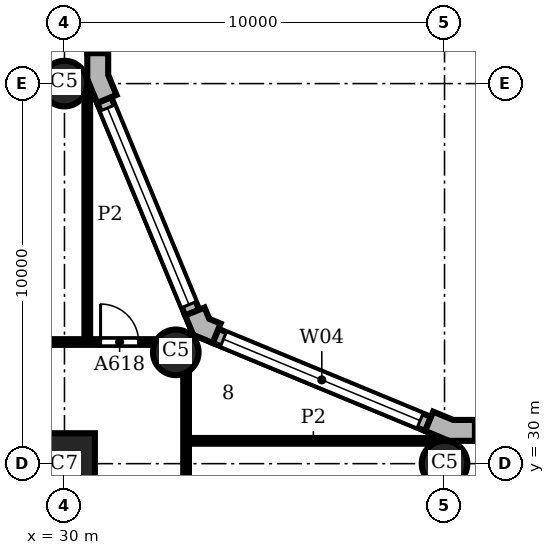
"""IFC4 building model, lengths in metres.
Left out: names, types, materials, properties, quantities, classifications, styles, units other than length and angle.
Written with IfcOpenShell. Run it as: python <this file> out.ifc"""

import sys

from ifc_helpers import new_model, si_unit, direction, frame, frame_2d, origin, origin_2d, place, context, subcontext, project, spatial, polyline, rectangle, circle, outline, extrude, element, fill, save


model = new_model("IFC4")
c1 = context("Model", 3, precision=1e-05, world=origin(), true_north=direction((0.0, 1.0)))
c2 = subcontext(c1, "Body", "Model", "MODEL_VIEW")
j1 = project(units=[si_unit("LENGTHUNIT", "METRE"), si_unit("PLANEANGLEUNIT", "RADIAN")], contexts=[c1])
p1 = place(None, origin())
s1 = spatial("IfcSite", under=j1, at=p1, CompositionType="ELEMENT")
p2 = place(p1, origin())
s2 = spatial("IfcBuilding", under=s1, at=p2, CompositionType="ELEMENT")
p3 = place(p2, frame((0.0, 0.0, 70.5)))
s3 = spatial("IfcBuildingStorey", under=s2, at=p3, CompositionType="ELEMENT", Elevation=70.5)
for number, where, z_axis, x_axis in (
    (1, (40.0, 30.0, 0.0), (0.0, 0.0, 1.0), (1.0, 0.0, 0.0)),
    (2, (32.929, 32.929, 0.0), (0.0, 0.0, 1.0), (1.0, 0.0, 0.0)),
    (3, (30.0, 40.0, 0.0), (0.0, 0.0, 1.0), (1.0, 0.0, 0.0)),
):
    element("IfcColumn", number, at=place(p3, frame(where, z_axis=z_axis, x_axis=x_axis)), inside=s3, PredefinedType="COLUMN", context=c2, shape_type="SweptSolid", body=[
        extrude(circle(Radius=0.6, at=origin_2d()), origin(), (0.0, 0.0, 1.0), 3.9),
    ])
p4 = place(p3, frame((30.0, 30.0, 0.0), z_axis=(0.0, 0.0, 1.0), x_axis=(1.0, 0.0, 0.0)))
e4 = element("IfcColumn", 4, at=p4, inside=s3, PredefinedType="COLUMN", context=c2, shape_type="SweptSolid", body=[
    extrude(rectangle(XDim=1.6, YDim=1.6, at=origin_2d()), origin(), (0.0, 0.0, 1.0), 3.9),
])
p5 = place(p3, origin())
e5 = element("IfcWall", 5, at=p5, inside=s3, PredefinedType="SOLIDWALL", context=c2, shape_type="SweptSolid", body=[
    extrude(outline(polyline([(40.8, 31.0), (40.8, 31.15), (40.229, 31.15), (39.701, 31.369), (39.644, 31.23), (39.49, 30.861), (40.119, 30.6), (40.8, 30.6), (40.8, 31.0)])), origin(), (0.0, 0.0, 1.0), 3.9),
])
e6 = element("IfcWall", 6, at=p5, inside=s3, PredefinedType="SOLIDWALL", context=c2, shape_type="SweptSolid", body=[
    extrude(outline(polyline([(34.051, 33.547), (34.108, 33.685), (33.809, 33.809), (33.685, 34.108), (33.547, 34.051), (33.177, 33.898), (33.388, 33.388), (33.898, 33.177), (34.051, 33.547)])), origin(), (0.0, 0.0, 1.0), 3.9),
])
e7 = element("IfcWall", 7, at=p5, inside=s3, PredefinedType="SOLIDWALL", context=c2, shape_type="SweptSolid", body=[
    extrude(outline(polyline([(31.23, 39.644), (31.369, 39.701), (31.15, 40.229), (31.15, 40.8), (31.0, 40.8), (30.6, 40.8), (30.6, 40.119), (30.861, 39.49), (31.23, 39.644)])), origin(), (0.0, 0.0, 1.0), 3.9),
])
p6 = place(p3, frame((69.2, 30.8, 0.0), z_axis=(0.0, 0.0, 1.0), x_axis=(-1.0, 0.0, 0.0)))
e8 = element("IfcWall", 8, at=p6, inside=s3, PredefinedType="SOLIDWALL", context=c2, shape_type="SweptSolid", body=[
    extrude(rectangle(XDim=28.4, YDim=0.4, at=frame_2d((14.2, 0.0))), origin(), (0.0, 0.0, 1.0), 3.9),
])
p7 = place(p6, frame((0.2, 0.0, 0.9)))
e9 = element("IfcOpeningElement", 9, at=p7, cuts=e8, PredefinedType="OPENING", context=c2, shape_type="SweptSolid", body=[
    extrude(rectangle(XDim=8.0, YDim=2.35, at=frame_2d((4.0, 1.175))), frame((0.0, 0.21, 0.0), z_axis=(0.0, -1.0, 0.0), x_axis=(1.0, 0.0, 0.0)), (0.0, 0.0, 1.0), 0.42),
])
p8 = place(p6, frame((10.2, 0.0, 0.9)))
e10 = element("IfcOpeningElement", 10, at=p8, cuts=e8, PredefinedType="OPENING", context=c2, shape_type="SweptSolid", body=[
    extrude(rectangle(XDim=8.0, YDim=2.35, at=frame_2d((4.0, 1.175))), frame((0.0, 0.21, 0.0), z_axis=(0.0, -1.0, 0.0), x_axis=(1.0, 0.0, 0.0)), (0.0, 0.0, 1.0), 0.42),
])
p9 = place(p6, frame((20.2, 0.0, 0.9)))
e11 = element("IfcOpeningElement", 11, at=p9, cuts=e8, PredefinedType="OPENING", context=c2, shape_type="SweptSolid", body=[
    extrude(rectangle(XDim=8.0, YDim=2.35, at=frame_2d((4.0, 1.175))), frame((0.0, 0.21, 0.0), z_axis=(0.0, -1.0, 0.0), x_axis=(1.0, 0.0, 0.0)), (0.0, 0.0, 1.0), 0.42),
])
p10 = place(p3, frame((39.567, 31.045, 0.0), z_axis=(0.0, 0.0, 1.0), x_axis=(-0.923891000409, 0.382655745237, 0.0)))
e12 = element("IfcWall", 12, at=p10, inside=s3, PredefinedType="SOLIDWALL", context=c2, shape_type="SweptSolid", body=[
    extrude(rectangle(XDim=6.053, YDim=0.4, at=frame_2d((3.027, 0.0))), origin(), (0.0, 0.0, 1.0), 3.9),
])
p11 = place(p10, frame((0.227, 0.0, 0.9)))
e13 = element("IfcOpeningElement", 13, at=p11, cuts=e12, PredefinedType="OPENING", context=c2, shape_type="SweptSolid", body=[
    extrude(rectangle(XDim=5.6, YDim=2.35, at=frame_2d((2.8, 1.175))), frame((0.0, 0.21, 0.0), z_axis=(0.0, -1.0, 0.0), x_axis=(1.0, 0.0, 0.0)), (0.0, 0.0, 1.0), 0.42),
])
p12 = place(p3, frame((33.362, 33.974, 0.0), z_axis=(0.0, 0.0, 1.0), x_axis=(-0.382655745237, 0.923891000409, 0.0)))
e14 = element("IfcWall", 14, at=p12, inside=s3, PredefinedType="SOLIDWALL", context=c2, shape_type="SweptSolid", body=[
    extrude(rectangle(XDim=6.053, YDim=0.4, at=frame_2d((3.027, 0.0))), origin(), (0.0, 0.0, 1.0), 3.9),
])
p13 = place(p12, frame((0.227, 0.0, 0.9)))
e15 = element("IfcOpeningElement", 15, at=p13, cuts=e14, PredefinedType="OPENING", context=c2, shape_type="SweptSolid", body=[
    extrude(rectangle(XDim=5.6, YDim=2.35, at=frame_2d((2.8, 1.175))), frame((0.0, 0.21, 0.0), z_axis=(0.0, -1.0, 0.0), x_axis=(1.0, 0.0, 0.0)), (0.0, 0.0, 1.0), 0.42),
])
p14 = place(p3, frame((30.8, 40.8, 0.0), z_axis=(0.0, 0.0, 1.0), x_axis=(0.0, 1.0, 0.0)))
e16 = element("IfcWall", 16, at=p14, inside=s3, PredefinedType="SOLIDWALL", context=c2, shape_type="SweptSolid", body=[
    extrude(rectangle(XDim=18.4, YDim=0.4, at=frame_2d((9.2, 0.0))), origin(), (0.0, 0.0, 1.0), 3.9),
])
p15 = place(p14, frame((0.2, 0.0, 0.9)))
e17 = element("IfcOpeningElement", 17, at=p15, cuts=e16, PredefinedType="OPENING", context=c2, shape_type="SweptSolid", body=[
    extrude(rectangle(XDim=8.0, YDim=2.35, at=frame_2d((4.0, 1.175))), frame((0.0, 0.21, 0.0), z_axis=(0.0, -1.0, 0.0), x_axis=(1.0, 0.0, 0.0)), (0.0, 0.0, 1.0), 0.42),
])
p16 = place(p14, frame((10.2, 0.0, 0.9)))
e18 = element("IfcOpeningElement", 18, at=p16, cuts=e16, PredefinedType="OPENING", context=c2, shape_type="SweptSolid", body=[
    extrude(rectangle(XDim=8.0, YDim=2.35, at=frame_2d((4.0, 1.175))), frame((0.0, 0.21, 0.0), z_axis=(0.0, -1.0, 0.0), x_axis=(1.0, 0.0, 0.0)), (0.0, 0.0, 1.0), 0.42),
])
p17 = place(p3, frame((30.6, 33.2, 0.0), z_axis=(0.0, 0.0, 1.0), x_axis=(0.0, 1.0, 0.0)))
e19 = element("IfcWall", 19, at=p17, inside=s3, PredefinedType="PARTITIONING", context=c2, shape_type="SweptSolid", body=[
    extrude(rectangle(XDim=6.699, YDim=0.15, at=frame_2d((3.35, 0.0))), origin(), (0.0, 0.0, 1.0), 3.58),
])
p18 = place(p3, frame((33.2, 15.45, 0.0), z_axis=(0.0, 0.0, 1.0), x_axis=(0.0, 1.0, 0.0)))
e20 = element("IfcWall", 20, at=p18, inside=s3, PredefinedType="PARTITIONING", context=c2, shape_type="SweptSolid", body=[
    extrude(rectangle(XDim=16.912, YDim=0.15, at=frame_2d((8.456, 0.0))), origin(), (0.0, 0.0, 1.0), 3.58),
])
p19 = place(p18, frame((10.6, 0.0, 0.0)))
e21 = element("IfcOpeningElement", 21, at=p19, cuts=e20, PredefinedType="OPENING", context=c2, shape_type="SweptSolid", body=[
    extrude(rectangle(XDim=1.0, YDim=2.1, at=frame_2d((0.5, 1.05))), frame((0.0, 0.085, 0.0), z_axis=(0.0, -1.0, 0.0), x_axis=(1.0, 0.0, 0.0)), (0.0, 0.0, 1.0), 0.17),
])
p20 = place(p3, frame((33.2, 30.6, 0.0), z_axis=(0.0, 0.0, 1.0), x_axis=(1.0, 0.0, 0.0)))
e22 = element("IfcWall", 22, at=p20, inside=s3, PredefinedType="PARTITIONING", context=c2, shape_type="SweptSolid", body=[
    extrude(rectangle(XDim=6.699, YDim=0.15, at=frame_2d((3.35, 0.0))), origin(), (0.0, 0.0, 1.0), 3.58),
])
p21 = place(p3, frame((16.5, 33.2, 0.0), z_axis=(0.0, 0.0, 1.0), x_axis=(1.0, 0.0, 0.0)))
e23 = element("IfcWall", 23, at=p21, inside=s3, PredefinedType="PARTITIONING", context=c2, shape_type="SweptSolid", body=[
    extrude(rectangle(XDim=15.862, YDim=0.15, at=frame_2d((7.931, 0.0))), origin(), (0.0, 0.0, 1.0), 3.58),
])
p22 = place(p21, frame((10.05, 0.0, 0.0)))
e24 = element("IfcOpeningElement", 24, at=p22, cuts=e23, PredefinedType="OPENING", context=c2, shape_type="SweptSolid", body=[
    extrude(rectangle(XDim=1.8, YDim=2.1, at=frame_2d((0.9, 1.05))), frame((0.0, 0.085, 0.0), z_axis=(0.0, -1.0, 0.0), x_axis=(1.0, 0.0, 0.0)), (0.0, 0.0, 1.0), 0.17),
])
p23 = place(p21, frame((14.45, 0.0, 0.0)))
e25 = element("IfcOpeningElement", 25, at=p23, cuts=e23, PredefinedType="OPENING", context=c2, shape_type="SweptSolid", body=[
    extrude(rectangle(XDim=1.0, YDim=2.1, at=frame_2d((0.5, 1.05))), frame((0.0, 0.085, 0.0), z_axis=(0.0, -1.0, 0.0), x_axis=(1.0, 0.0, 0.0)), (0.0, 0.0, 1.0), 0.17),
])
p24 = place(p11, origin())
e26 = element("IfcWindow", 26, at=p24, inside=s3, PartitioningType="SINGLE_PANEL", PredefinedType="WINDOW", context=c2, shape_type="SweptSolid", body=[
    extrude(rectangle(XDim=5.6, YDim=2.35, at=frame_2d((2.8, 1.175))), frame((0.0, 0.16, 0.0), z_axis=(0.0, -1.0, 0.0), x_axis=(1.0, 0.0, 0.0)), (0.0, 0.0, 1.0), 0.06),
])
fill(e13, e26)
p25 = place(p13, origin())
e27 = element("IfcWindow", 27, at=p25, inside=s3, PartitioningType="SINGLE_PANEL", PredefinedType="WINDOW", context=c2, shape_type="SweptSolid", body=[
    extrude(rectangle(XDim=5.6, YDim=2.35, at=frame_2d((2.8, 1.175))), frame((0.0, 0.16, 0.0), z_axis=(0.0, -1.0, 0.0), x_axis=(1.0, 0.0, 0.0)), (0.0, 0.0, 1.0), 0.06),
])
fill(e15, e27)
p26 = place(p23, origin())
e28 = element("IfcDoor", 28, at=p26, inside=s3, OperationType="SINGLE_SWING_LEFT", PredefinedType="DOOR", context=c2, shape_type="SweptSolid", body=[
    extrude(rectangle(XDim=1.0, YDim=2.1, at=frame_2d((0.5, 1.05))), frame((0.0, 0.025, 0.0), z_axis=(0.0, -1.0, 0.0), x_axis=(1.0, 0.0, 0.0)), (0.0, 0.0, 1.0), 0.05),
])
fill(e25, e28)
save(model, sys.argv[1])
